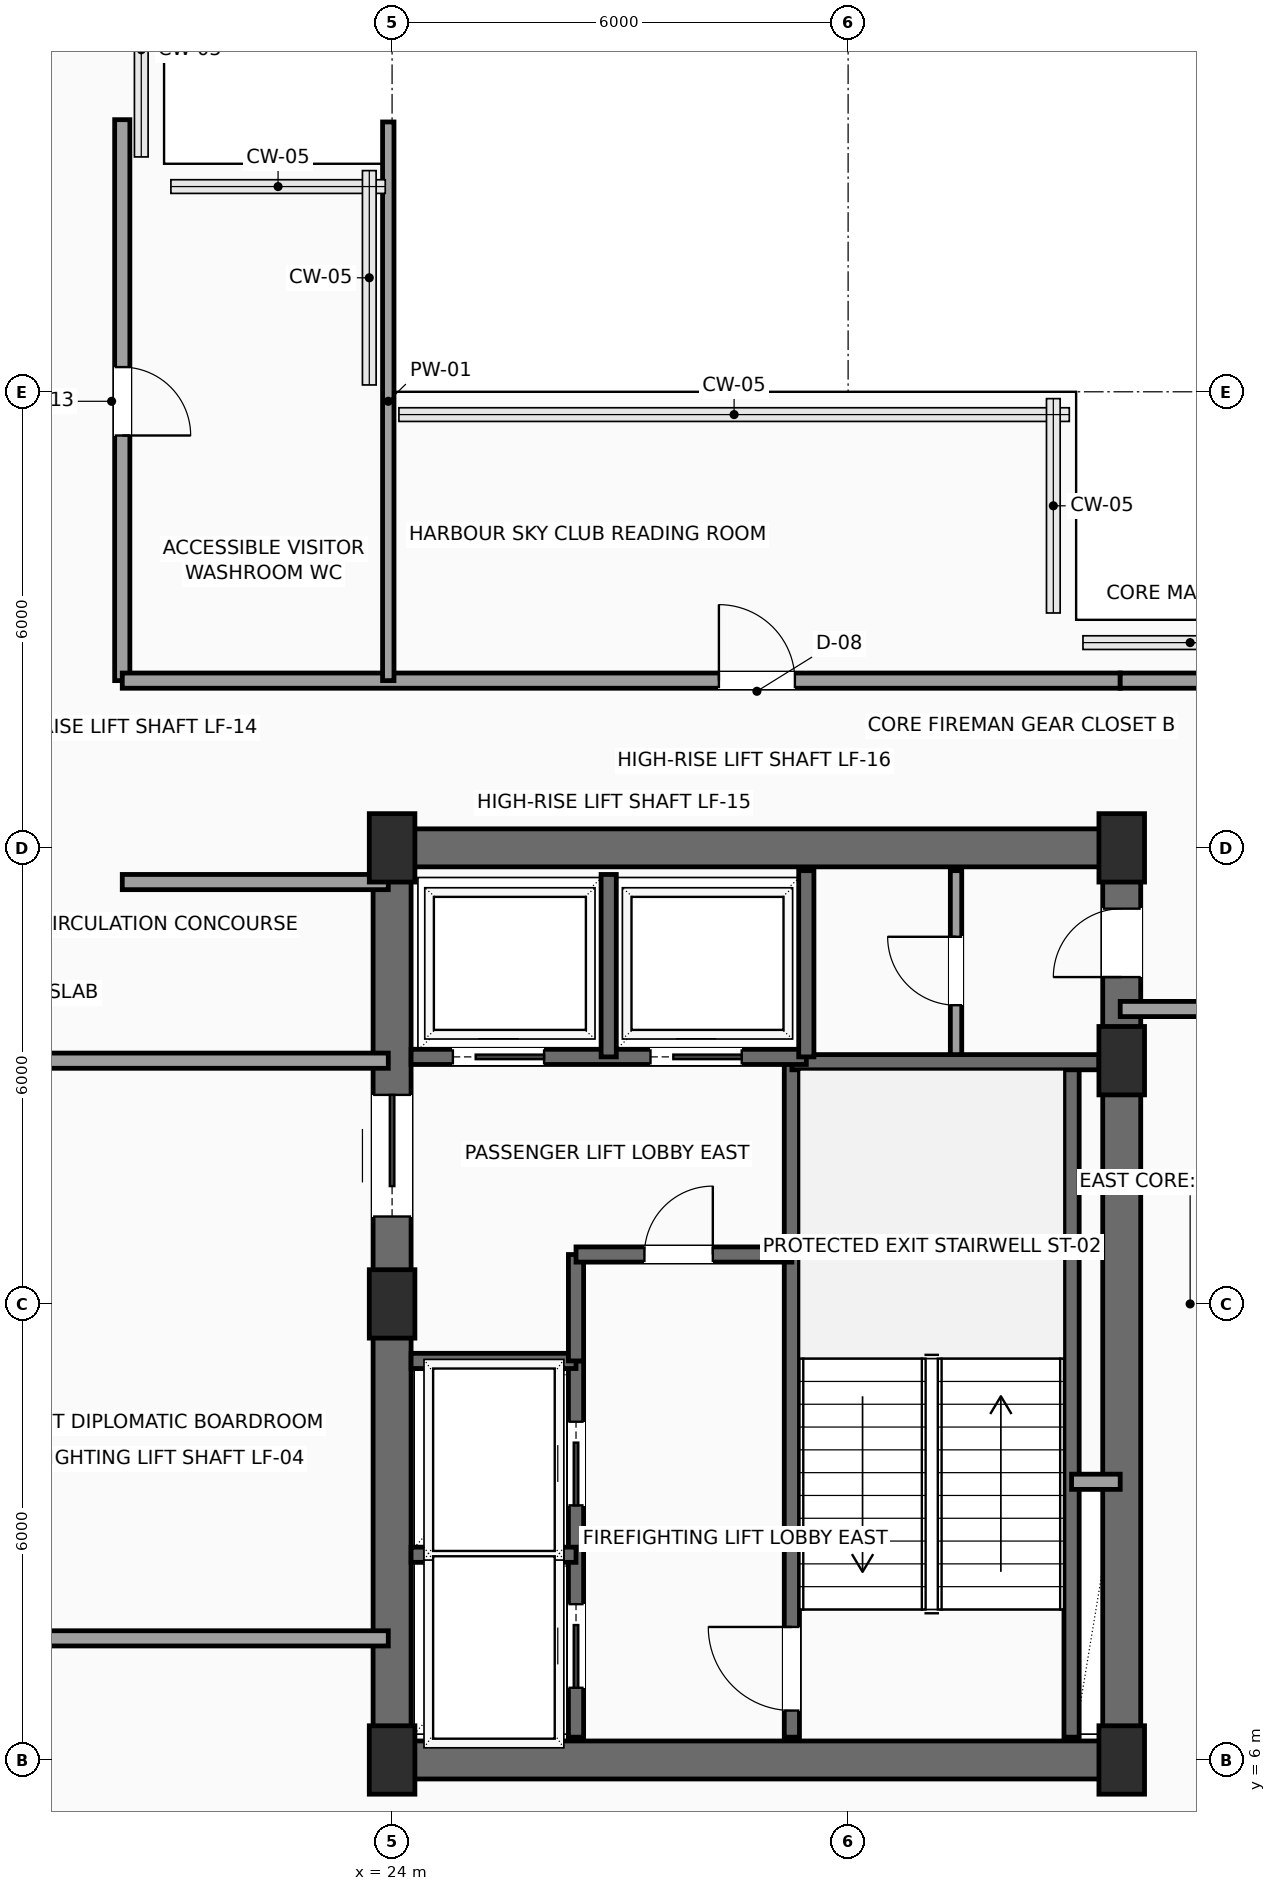
"""IFC4 building model, lengths in metres.
Left out: names, types, materials, properties, quantities, classifications, styles, units other than length and angle.
Written with IfcOpenShell. Run it as: python <this file> out.ifc"""

import sys

from ifc_helpers import new_model, si_unit, direction, frame, frame_2d, origin, origin_2d, place, context, subcontext, project, spatial, rectangle, extrude, element, fill, save


model = new_model("IFC4")
c1 = context("Model", 3, precision=1e-05, world=origin(), true_north=direction((0.0, 1.0)))
c2 = subcontext(c1, "Body", "Model", "MODEL_VIEW")
j1 = project(units=[si_unit("LENGTHUNIT", "METRE"), si_unit("PLANEANGLEUNIT", "RADIAN")], contexts=[c1])
p1 = place(None, origin())
s1 = spatial("IfcSite", under=j1, at=p1, CompositionType="ELEMENT")
p2 = place(p1, origin())
s2 = spatial("IfcBuilding", under=s1, at=p2, CompositionType="ELEMENT")
p3 = place(p2, frame((0.0, 0.0, 281.7)))
s3 = spatial("IfcBuildingStorey", under=s2, at=p3, CompositionType="ELEMENT", Elevation=281.7)
for number, where, z_axis, x_axis in (
    (1, (24.0, 6.0, 0.0), (0.0, 0.0, 1.0), (1.0, 0.0, 0.0)),
    (2, (24.0, 12.0, 0.0), (0.0, 0.0, 1.0), (1.0, 0.0, 0.0)),
    (3, (24.0, 18.0, 0.0), (0.0, 0.0, 1.0), (1.0, 0.0, 0.0)),
    (4, (33.6, 6.0, 0.0), (0.0, 0.0, 1.0), (1.0, 0.0, 0.0)),
    (5, (33.6, 15.2, 0.0), (0.0, 0.0, 1.0), (1.0, 0.0, 0.0)),
    (6, (33.6, 18.0, 0.0), (0.0, 0.0, 1.0), (1.0, 0.0, 0.0)),
):
    element("IfcColumn", number, at=place(p3, frame(where, z_axis=z_axis, x_axis=x_axis)), inside=s3, PredefinedType="COLUMN", context=c2, shape_type="SweptSolid", body=[
        extrude(rectangle(XDim=0.6, YDim=0.9, at=origin_2d()), origin(), (0.0, 0.0, 1.0), 3.5),
    ])
for number, where, z_axis, x_axis in (
    (7, (24.0, 6.0, 0.0), (0.0, 0.0, 1.0), (1.0, 0.0, 0.0)),
    (8, (24.0, 18.0, 0.0), (0.0, 0.0, 1.0), (1.0, 0.0, 0.0)),
):
    element("IfcWall", number, at=place(p3, frame(where, z_axis=z_axis, x_axis=x_axis)), inside=s3, PredefinedType="SHEAR", context=c2, shape_type="SweptSolid", body=[
        extrude(rectangle(XDim=9.6, YDim=0.5, at=frame_2d((4.8, 0.0))), origin(), (0.0, 0.0, 1.0), 3.3),
    ])
p4 = place(p3, frame((24.0, 6.0, 0.0), z_axis=(0.0, 0.0, 1.0), x_axis=(0.0, 1.0, 0.0)))
e9 = element("IfcWall", 9, at=p4, inside=s3, PredefinedType="SHEAR", context=c2, shape_type="SweptSolid", body=[
    extrude(rectangle(XDim=12.0, YDim=0.5, at=frame_2d((6.0, 0.0))), origin(), (0.0, 0.0, 1.0), 3.3),
])
p5 = place(p4, frame((7.15, 0.0, 0.0)))
e10 = element("IfcOpeningElement", 10, at=p5, cuts=e9, PredefinedType="OPENING", context=c2, shape_type="SweptSolid", body=[
    extrude(rectangle(XDim=1.6, YDim=2.3, at=frame_2d((0.8, 1.15))), frame((0.0, 0.26, 0.0), z_axis=(0.0, -1.0, 0.0), x_axis=(1.0, 0.0, 0.0)), (0.0, 0.0, 1.0), 0.52),
])
p6 = place(p3, frame((33.6, 6.0, 0.0), z_axis=(0.0, 0.0, 1.0), x_axis=(0.0, 1.0, 0.0)))
e11 = element("IfcWall", 11, at=p6, inside=s3, PredefinedType="SHEAR", context=c2, shape_type="SweptSolid", body=[
    extrude(rectangle(XDim=12.0, YDim=0.5, at=frame_2d((6.0, 0.0))), origin(), (0.0, 0.0, 1.0), 3.3),
])
p7 = place(p6, frame((10.3, 0.0, 0.0)))
e12 = element("IfcOpeningElement", 12, at=p7, cuts=e11, PredefinedType="OPENING", context=c2, shape_type="SweptSolid", body=[
    extrude(rectangle(XDim=0.9, YDim=2.15, at=frame_2d((0.45, 1.075))), frame((0.0, 0.26, 0.0), z_axis=(0.0, -1.0, 0.0), x_axis=(1.0, 0.0, 0.0)), (0.0, 0.0, 1.0), 0.52),
])
p8 = place(p3, frame((29.26, 6.3, 0.0), z_axis=(0.0, 0.0, 1.0), x_axis=(0.0, 1.0, 0.0)))
e13 = element("IfcWall", 13, at=p8, inside=s3, PredefinedType="SHEAR", context=c2, shape_type="SweptSolid", body=[
    extrude(rectangle(XDim=8.88, YDim=0.2, at=frame_2d((4.44, 0.0))), origin(), (0.0, 0.0, 1.0), 3.3),
])
p9 = place(p8, frame((0.35, 0.0, 0.0)))
e14 = element("IfcOpeningElement", 14, at=p9, cuts=e13, PredefinedType="OPENING", context=c2, shape_type="SweptSolid", body=[
    extrude(rectangle(XDim=1.1, YDim=2.2, at=frame_2d((0.55, 1.1))), frame((0.0, 0.11, 0.0), z_axis=(0.0, -1.0, 0.0), x_axis=(1.0, 0.0, 0.0)), (0.0, 0.0, 1.0), 0.22),
])
p10 = place(p3, frame((32.94, 6.3, 0.0), z_axis=(0.0, 0.0, 1.0), x_axis=(0.0, 1.0, 0.0)))
e15 = element("IfcWall", 15, at=p10, inside=s3, PredefinedType="SHEAR", context=c2, shape_type="SweptSolid", body=[
    extrude(rectangle(XDim=8.88, YDim=0.2, at=frame_2d((4.44, 0.0))), origin(), (0.0, 0.0, 1.0), 3.3),
])
p11 = place(p3, frame((29.26, 15.18, 0.0), z_axis=(0.0, 0.0, 1.0), x_axis=(1.0, 0.0, 0.0)))
e16 = element("IfcWall", 16, at=p11, inside=s3, PredefinedType="SHEAR", context=c2, shape_type="SweptSolid", body=[
    extrude(rectangle(XDim=4.04, YDim=0.2, at=frame_2d((2.02, 0.0))), origin(), (0.0, 0.0, 1.0), 3.3),
])
p12 = place(p3, frame((26.42, 6.3, 0.0), z_axis=(0.0, 0.0, 1.0), x_axis=(0.0, 1.0, 0.0)))
e17 = element("IfcWall", 17, at=p12, inside=s3, PredefinedType="SHEAR", context=c2, shape_type="SweptSolid", body=[
    extrude(rectangle(XDim=4.95, YDim=0.2, at=frame_2d((2.475, 0.0))), origin(), (0.0, 0.0, 1.0), 3.3),
])
p13 = place(p12, frame((0.65, 0.0, 0.0)))
e18 = element("IfcOpeningElement", 18, at=p13, cuts=e17, PredefinedType="OPENING", context=c2, shape_type="SweptSolid", body=[
    extrude(rectangle(XDim=1.1, YDim=2.2, at=frame_2d((0.55, 1.1))), frame((0.0, 0.11, 0.0), z_axis=(0.0, -1.0, 0.0), x_axis=(1.0, 0.0, 0.0)), (0.0, 0.0, 1.0), 0.22),
])
p14 = place(p12, frame((3.05, 0.0, 0.0)))
e19 = element("IfcOpeningElement", 19, at=p14, cuts=e17, PredefinedType="OPENING", context=c2, shape_type="SweptSolid", body=[
    extrude(rectangle(XDim=1.1, YDim=2.2, at=frame_2d((0.55, 1.1))), frame((0.0, 0.11, 0.0), z_axis=(0.0, -1.0, 0.0), x_axis=(1.0, 0.0, 0.0)), (0.0, 0.0, 1.0), 0.22),
])
for number, where, z_axis, x_axis in (
    (20, (24.25, 8.7, 0.0), (0.0, 0.0, 1.0), (1.0, 0.0, 0.0)),
    (21, (24.25, 11.25, 0.0), (0.0, 0.0, 1.0), (1.0, 0.0, 0.0)),
):
    element("IfcWall", number, at=place(p3, frame(where, z_axis=z_axis, x_axis=x_axis)), inside=s3, PredefinedType="SHEAR", context=c2, shape_type="SweptSolid", body=[
        extrude(rectangle(XDim=2.17, YDim=0.2, at=frame_2d((1.085, 0.0))), origin(), (0.0, 0.0, 1.0), 3.3),
    ])
p15 = place(p3, frame((26.42, 11.25, 0.0), z_axis=(0.0, 0.0, 1.0), x_axis=(0.0, 1.0, 0.0)))
e22 = element("IfcWall", 22, at=p15, inside=s3, PredefinedType="SHEAR", context=c2, shape_type="SweptSolid", body=[
    extrude(rectangle(XDim=1.4, YDim=0.2, at=frame_2d((0.7, 0.0))), origin(), (0.0, 0.0, 1.0), 3.3),
])
p16 = place(p3, frame((26.42, 12.65, 0.0), z_axis=(0.0, 0.0, 1.0), x_axis=(1.0, 0.0, 0.0)))
e23 = element("IfcWall", 23, at=p16, inside=s3, PredefinedType="SHEAR", context=c2, shape_type="SweptSolid", body=[
    extrude(rectangle(XDim=2.84, YDim=0.2, at=frame_2d((1.42, 0.0))), origin(), (0.0, 0.0, 1.0), 3.3),
])
p17 = place(p16, frame((0.9, 0.0, 0.0)))
e24 = element("IfcOpeningElement", 24, at=p17, cuts=e23, PredefinedType="OPENING", context=c2, shape_type="SweptSolid", body=[
    extrude(rectangle(XDim=0.9, YDim=2.15, at=frame_2d((0.45, 1.075))), frame((0.0, 0.11, 0.0), z_axis=(0.0, -1.0, 0.0), x_axis=(1.0, 0.0, 0.0)), (0.0, 0.0, 1.0), 0.22),
])
p18 = place(p3, frame((32.94, 9.66, 0.0), z_axis=(0.0, 0.0, 1.0), x_axis=(1.0, 0.0, 0.0)))
e25 = element("IfcWall", 25, at=p18, inside=s3, PredefinedType="SOLIDWALL", context=c2, shape_type="SweptSolid", body=[
    extrude(rectangle(XDim=0.64, YDim=0.2, at=frame_2d((0.32, 0.0))), origin(), (0.0, 0.0, 1.0), 3.3),
])
p19 = place(p3, frame((24.25, 15.25, 0.0), z_axis=(0.0, 0.0, 1.0), x_axis=(1.0, 0.0, 0.0)))
e26 = element("IfcWall", 26, at=p19, inside=s3, PredefinedType="SHEAR", context=c2, shape_type="SweptSolid", body=[
    extrude(rectangle(XDim=5.2, YDim=0.2, at=frame_2d((2.6, 0.0))), origin(), (0.0, 0.0, 1.0), 3.3),
])
p20 = place(p19, frame((0.55, 0.0, 0.0)))
e27 = element("IfcOpeningElement", 27, at=p20, cuts=e26, PredefinedType="OPENING", context=c2, shape_type="SweptSolid", body=[
    extrude(rectangle(XDim=1.2, YDim=2.2, at=frame_2d((0.6, 1.1))), frame((0.0, 0.11, 0.0), z_axis=(0.0, -1.0, 0.0), x_axis=(1.0, 0.0, 0.0)), (0.0, 0.0, 1.0), 0.22),
])
p21 = place(p19, frame((3.15, 0.0, 0.0)))
e28 = element("IfcOpeningElement", 28, at=p21, cuts=e26, PredefinedType="OPENING", context=c2, shape_type="SweptSolid", body=[
    extrude(rectangle(XDim=1.2, YDim=2.2, at=frame_2d((0.6, 1.1))), frame((0.0, 0.11, 0.0), z_axis=(0.0, -1.0, 0.0), x_axis=(1.0, 0.0, 0.0)), (0.0, 0.0, 1.0), 0.22),
])
p22 = place(p3, frame((26.85, 15.25, 0.0), z_axis=(0.0, 0.0, 1.0), x_axis=(0.0, 1.0, 0.0)))
e29 = element("IfcWall", 29, at=p22, inside=s3, PredefinedType="SHEAR", context=c2, shape_type="SweptSolid", body=[
    extrude(rectangle(XDim=2.4, YDim=0.2, at=frame_2d((1.2, 0.0))), origin(), (0.0, 0.0, 1.0), 3.3),
])
p23 = place(p3, frame((29.45, 15.25, 0.0), z_axis=(0.0, 0.0, 1.0), x_axis=(0.0, 1.0, 0.0)))
e30 = element("IfcWall", 30, at=p23, inside=s3, PredefinedType="SHEAR", context=c2, shape_type="SweptSolid", body=[
    extrude(rectangle(XDim=2.45, YDim=0.2, at=frame_2d((1.225, 0.0))), origin(), (0.0, 0.0, 1.0), 3.3),
])
p24 = place(p3, frame((31.42, 15.28, 0.0), z_axis=(0.0, 0.0, 1.0), x_axis=(0.0, 1.0, 0.0)))
e31 = element("IfcWall", 31, at=p24, inside=s3, PredefinedType="PARTITIONING", context=c2, shape_type="SweptSolid", body=[
    extrude(rectangle(XDim=2.42, YDim=0.15, at=frame_2d((1.21, 0.0))), origin(), (0.0, 0.0, 1.0), 3.3),
])
p25 = place(p24, frame((0.65, 0.0, 0.0)))
e32 = element("IfcOpeningElement", 32, at=p25, cuts=e31, PredefinedType="OPENING", context=c2, shape_type="SweptSolid", body=[
    extrude(rectangle(XDim=0.9, YDim=2.15, at=frame_2d((0.45, 1.075))), frame((0.0, 0.085, 0.0), z_axis=(0.0, -1.0, 0.0), x_axis=(1.0, 0.0, 0.0)), (0.0, 0.0, 1.0), 0.17),
])
p26 = place(p3, frame((20.45, 27.58, 0.0), z_axis=(0.0, 0.0, 1.0), x_axis=(0.0, -1.0, 0.0)))
e33 = element("IfcWall", 33, at=p26, inside=s3, PredefinedType="SOLIDWALL", context=c2, shape_type="SweptSolid", body=[
    extrude(rectangle(XDim=7.38, YDim=0.2, at=frame_2d((3.69, 0.0))), origin(), (0.0, 0.0, 1.0), 3.3),
])
p27 = place(p26, frame((3.255, 0.0, 0.0)))
e34 = element("IfcOpeningElement", 34, at=p27, cuts=e33, PredefinedType="OPENING", context=c2, shape_type="SweptSolid", body=[
    extrude(rectangle(XDim=0.9, YDim=2.1, at=frame_2d((0.45, 1.05))), frame((0.0, 0.11, 0.0), z_axis=(0.0, -1.0, 0.0), x_axis=(1.0, 0.0, 0.0)), (0.0, 0.0, 1.0), 0.22),
])
p28 = place(p3, frame((20.45, 20.2, 0.0), z_axis=(0.0, 0.0, 1.0), x_axis=(1.0, 0.0, 0.0)))
e35 = element("IfcWall", 35, at=p28, inside=s3, PredefinedType="SOLIDWALL", context=c2, shape_type="SweptSolid", body=[
    extrude(rectangle(XDim=13.13, YDim=0.2, at=frame_2d((6.565, 0.0))), origin(), (0.0, 0.0, 1.0), 3.3),
])
p29 = place(p28, frame((7.85, 0.0, 0.0)))
e36 = element("IfcOpeningElement", 36, at=p29, cuts=e35, PredefinedType="OPENING", context=c2, shape_type="SweptSolid", body=[
    extrude(rectangle(XDim=1.0, YDim=2.2, at=frame_2d((0.5, 1.1))), frame((0.0, 0.11, 0.0), z_axis=(0.0, -1.0, 0.0), x_axis=(1.0, 0.0, 0.0)), (0.0, 0.0, 1.0), 0.22),
])
for number, where, z_axis, x_axis in (
    (37, (33.58, 20.2, 0.0), (0.0, 0.0, 1.0), (1.0, 0.0, 0.0)),
    (38, (35.7, 15.88, 0.0), (0.0, 0.0, 1.0), (-1.0, 0.0, 0.0)),
):
    element("IfcWall", number, at=place(p3, frame(where, z_axis=z_axis, x_axis=x_axis)), inside=s3, PredefinedType="SOLIDWALL", context=c2, shape_type="SweptSolid", body=[
        extrude(rectangle(XDim=2.12, YDim=0.2, at=frame_2d((1.06, 0.0))), origin(), (0.0, 0.0, 1.0), 3.3),
    ])
p30 = place(p3, frame((20.45, 17.55, 0.0), z_axis=(0.0, 0.0, 1.0), x_axis=(1.0, 0.0, 0.0)))
e39 = element("IfcWall", 39, at=p30, inside=s3, PredefinedType="SOLIDWALL", context=c2, shape_type="SweptSolid", body=[
    extrude(rectangle(XDim=3.5, YDim=0.2, at=frame_2d((1.75, 0.0))), origin(), (0.0, 0.0, 1.0), 3.3),
])
p31 = place(p3, frame((23.95, 15.2, 0.0), z_axis=(0.0, 0.0, 1.0), x_axis=(-1.0, 0.0, 0.0)))
e40 = element("IfcWall", 40, at=p31, inside=s3, PredefinedType="SOLIDWALL", context=c2, shape_type="SweptSolid", body=[
    extrude(rectangle(XDim=9.0, YDim=0.2, at=frame_2d((4.5, 0.0))), origin(), (0.0, 0.0, 1.0), 2.932),
])
p32 = place(p3, frame((23.95, 20.2, 0.0), z_axis=(0.0, 0.0, 1.0), x_axis=(0.0, 1.0, 0.0)))
e41 = element("IfcWall", 41, at=p32, inside=s3, PredefinedType="PARTITIONING", context=c2, shape_type="SweptSolid", body=[
    extrude(rectangle(XDim=7.35, YDim=0.15, at=frame_2d((3.675, 0.0))), origin(), (0.0, 0.0, 1.0), 3.3),
])
p33 = place(p3, frame((14.95, 7.6, 0.0), z_axis=(0.0, 0.0, 1.0), x_axis=(1.0, 0.0, 0.0)))
e42 = element("IfcWall", 42, at=p33, inside=s3, PredefinedType="PARTITIONING", context=c2, shape_type="SweptSolid", body=[
    extrude(rectangle(XDim=9.0, YDim=0.2, at=frame_2d((4.5, 0.0))), origin(), (0.0, 0.0, 1.0), 3.3),
])
p34 = place(p5, origin())
e43 = element("IfcDoor", 43, at=p34, inside=s3, OperationType="DOUBLE_DOOR_SLIDING", PredefinedType="DOOR", context=c2, shape_type="SweptSolid", body=[
    extrude(rectangle(XDim=1.6, YDim=2.3, at=frame_2d((0.8, 1.15))), frame((0.0, 0.025, 0.0), z_axis=(0.0, -1.0, 0.0), x_axis=(1.0, 0.0, 0.0)), (0.0, 0.0, 1.0), 0.05),
])
fill(e10, e43)
p35 = place(p7, origin())
e44 = element("IfcDoor", 44, at=p35, inside=s3, OperationType="SINGLE_SWING_LEFT", PredefinedType="DOOR", context=c2, shape_type="SweptSolid", body=[
    extrude(rectangle(XDim=0.9, YDim=2.15, at=frame_2d((0.45, 1.075))), frame((0.0, 0.025, 0.0), z_axis=(0.0, -1.0, 0.0), x_axis=(1.0, 0.0, 0.0)), (0.0, 0.0, 1.0), 0.05),
])
fill(e12, e44)
p36 = place(p9, origin())
e45 = element("IfcDoor", 45, at=p36, inside=s3, OperationType="SINGLE_SWING_RIGHT", PredefinedType="DOOR", context=c2, shape_type="SweptSolid", body=[
    extrude(rectangle(XDim=1.1, YDim=2.2, at=frame_2d((0.55, 1.1))), frame((0.0, 0.025, 0.0), z_axis=(0.0, -1.0, 0.0), x_axis=(1.0, 0.0, 0.0)), (0.0, 0.0, 1.0), 0.05),
])
fill(e14, e45)
p37 = place(p13, origin())
e46 = element("IfcDoor", 46, at=p37, inside=s3, OperationType="SLIDING_TO_LEFT", PredefinedType="DOOR", context=c2, shape_type="SweptSolid", body=[
    extrude(rectangle(XDim=1.1, YDim=2.2, at=frame_2d((0.55, 1.1))), frame((0.0, 0.025, 0.0), z_axis=(0.0, -1.0, 0.0), x_axis=(1.0, 0.0, 0.0)), (0.0, 0.0, 1.0), 0.05),
])
fill(e18, e46)
p38 = place(p14, origin())
e47 = element("IfcDoor", 47, at=p38, inside=s3, OperationType="SLIDING_TO_LEFT", PredefinedType="DOOR", context=c2, shape_type="SweptSolid", body=[
    extrude(rectangle(XDim=1.1, YDim=2.2, at=frame_2d((0.55, 1.1))), frame((0.0, 0.025, 0.0), z_axis=(0.0, -1.0, 0.0), x_axis=(1.0, 0.0, 0.0)), (0.0, 0.0, 1.0), 0.05),
])
fill(e19, e47)
p39 = place(p17, origin())
e48 = element("IfcDoor", 48, at=p39, inside=s3, OperationType="SINGLE_SWING_RIGHT", PredefinedType="DOOR", context=c2, shape_type="SweptSolid", body=[
    extrude(rectangle(XDim=0.9, YDim=2.15, at=frame_2d((0.45, 1.075))), frame((0.0, 0.025, 0.0), z_axis=(0.0, -1.0, 0.0), x_axis=(1.0, 0.0, 0.0)), (0.0, 0.0, 1.0), 0.05),
])
fill(e24, e48)
p40 = place(p20, origin())
e49 = element("IfcDoor", 49, at=p40, inside=s3, OperationType="SLIDING_TO_RIGHT", PredefinedType="DOOR", context=c2, shape_type="SweptSolid", body=[
    extrude(rectangle(XDim=1.2, YDim=2.2, at=frame_2d((0.6, 1.1))), frame((0.0, 0.025, 0.0), z_axis=(0.0, -1.0, 0.0), x_axis=(1.0, 0.0, 0.0)), (0.0, 0.0, 1.0), 0.05),
])
fill(e27, e49)
p41 = place(p21, origin())
e50 = element("IfcDoor", 50, at=p41, inside=s3, OperationType="SLIDING_TO_RIGHT", PredefinedType="DOOR", context=c2, shape_type="SweptSolid", body=[
    extrude(rectangle(XDim=1.2, YDim=2.2, at=frame_2d((0.6, 1.1))), frame((0.0, 0.025, 0.0), z_axis=(0.0, -1.0, 0.0), x_axis=(1.0, 0.0, 0.0)), (0.0, 0.0, 1.0), 0.05),
])
fill(e28, e50)
p42 = place(p25, origin())
e51 = element("IfcDoor", 51, at=p42, inside=s3, OperationType="SINGLE_SWING_RIGHT", PredefinedType="DOOR", context=c2, shape_type="SweptSolid", body=[
    extrude(rectangle(XDim=0.9, YDim=2.15, at=frame_2d((0.45, 1.075))), frame((0.0, 0.025, 0.0), z_axis=(0.0, -1.0, 0.0), x_axis=(1.0, 0.0, 0.0)), (0.0, 0.0, 1.0), 0.05),
])
fill(e32, e51)
p43 = place(p27, origin())
e52 = element("IfcDoor", 52, at=p43, inside=s3, OperationType="SINGLE_SWING_RIGHT", PredefinedType="DOOR", context=c2, shape_type="SweptSolid", body=[
    extrude(rectangle(XDim=0.9, YDim=2.1, at=frame_2d((0.45, 1.05))), frame((0.0, 0.025, 0.0), z_axis=(0.0, -1.0, 0.0), x_axis=(1.0, 0.0, 0.0)), (0.0, 0.0, 1.0), 0.05),
])
fill(e34, e52)
p44 = place(p29, origin())
e53 = element("IfcDoor", 53, at=p44, inside=s3, OperationType="SINGLE_SWING_LEFT", PredefinedType="DOOR", context=c2, shape_type="SweptSolid", body=[
    extrude(rectangle(XDim=1.0, YDim=2.2, at=frame_2d((0.5, 1.1))), frame((0.0, 0.025, 0.0), z_axis=(0.0, -1.0, 0.0), x_axis=(1.0, 0.0, 0.0)), (0.0, 0.0, 1.0), 0.05),
])
fill(e36, e53)
save(model, sys.argv[1])
